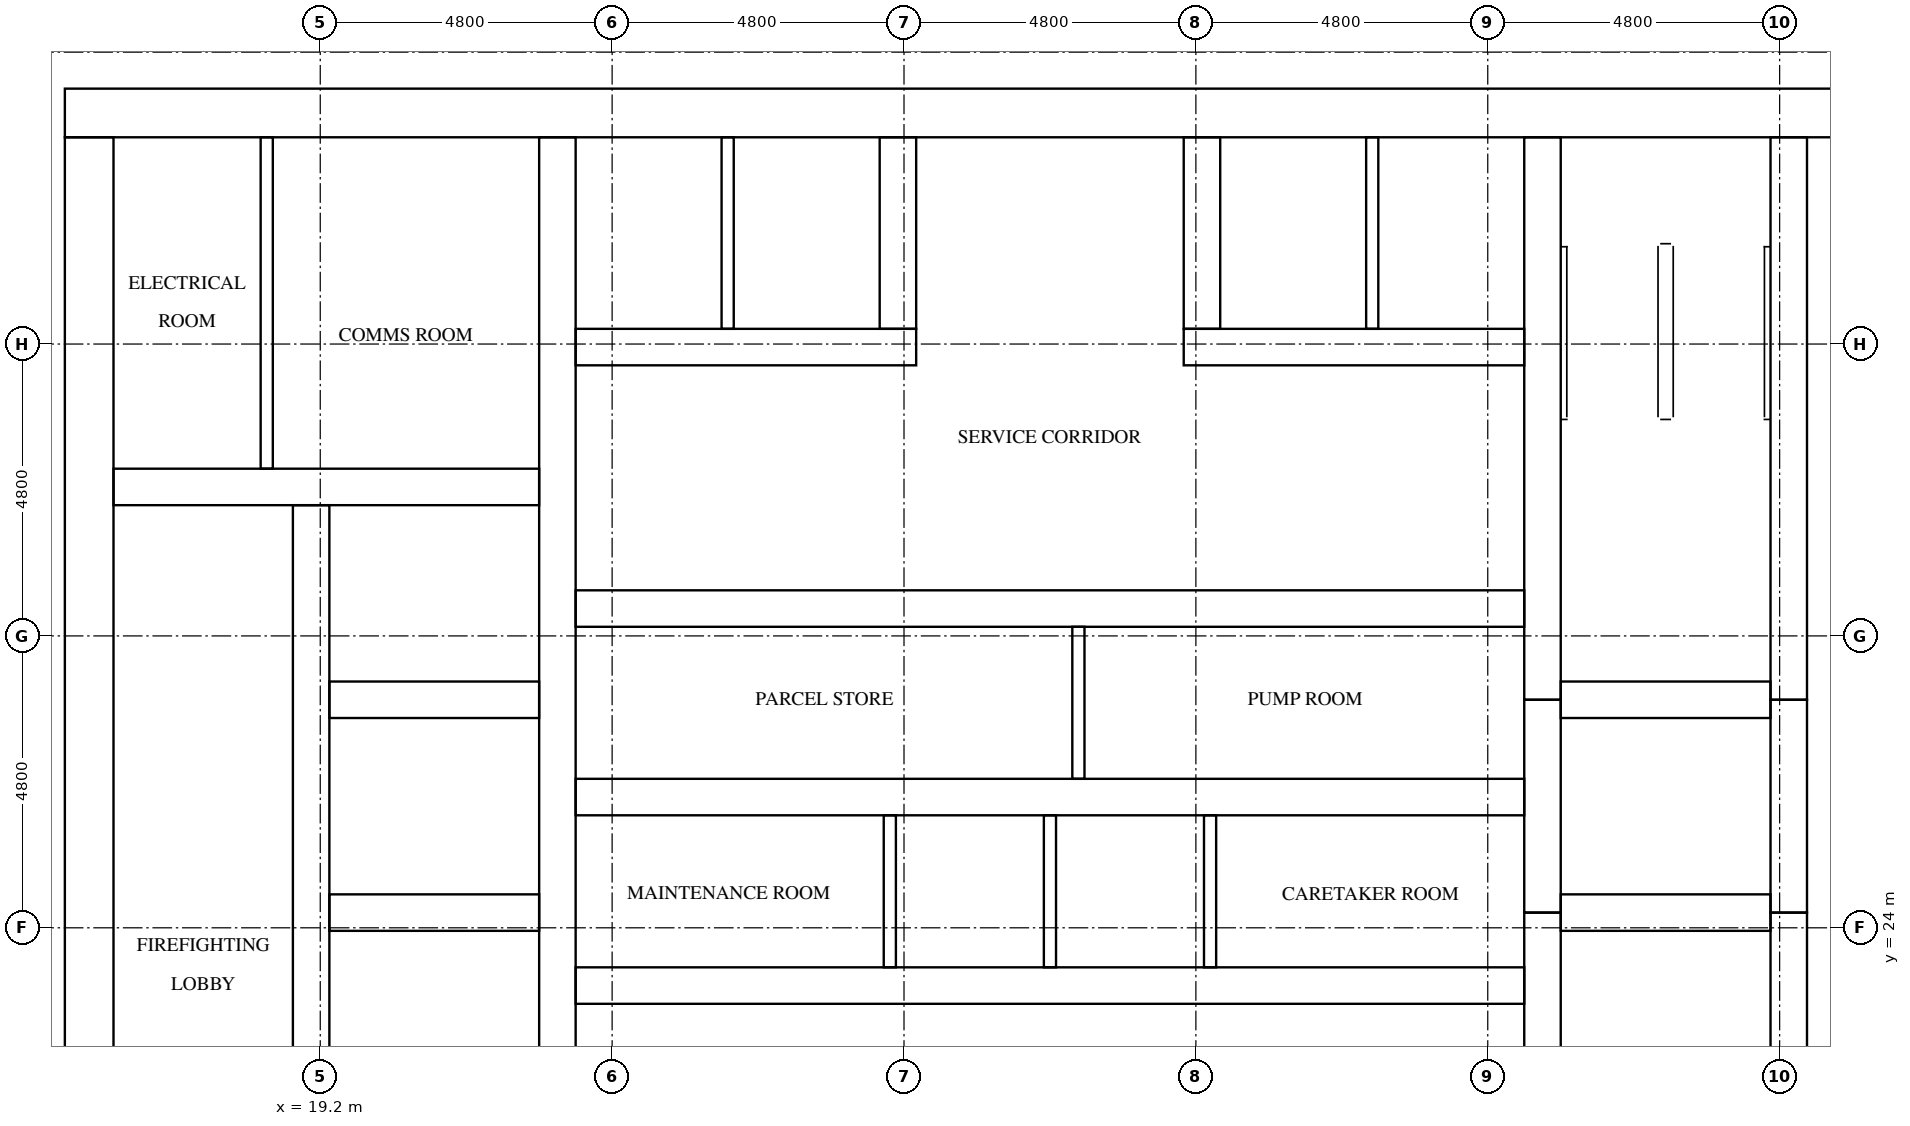
"""IFC4 building model, lengths in metres.
Left out: names, types, materials, properties, quantities, classifications, styles, units other than length and angle.
Written with IfcOpenShell. Run it as: python <this file> out.ifc"""

import sys

from ifc_helpers import new_model, si_unit, direction, frame, frame_2d, origin, place, context, subcontext, project, spatial, rectangle, extrude, element, fill, save


model = new_model("IFC4")
c1 = context("Model", 3, precision=1e-05, world=origin(), true_north=direction((0.0, 1.0)))
c2 = subcontext(c1, "Body", "Model", "MODEL_VIEW")
j1 = project(units=[si_unit("LENGTHUNIT", "METRE"), si_unit("PLANEANGLEUNIT", "RADIAN")], contexts=[c1])
p1 = place(None, origin())
s1 = spatial("IfcSite", under=j1, at=p1, CompositionType="ELEMENT")
p2 = place(p1, origin())
s2 = spatial("IfcBuilding", under=s1, at=p2, CompositionType="ELEMENT")
p3 = place(p2, frame((0.0, 0.0, 129.6)))
s3 = spatial("IfcBuildingStorey", under=s2, at=p3, CompositionType="ELEMENT", Elevation=129.6)
p4 = place(p3, frame((15.0, 37.4, 0.0), z_axis=(0.0, 0.0, 1.0), x_axis=(1.0, 0.0, 0.0)))
e1 = element("IfcWall", 1, at=p4, inside=s3, PredefinedType="SHEAR", context=c2, shape_type="SweptSolid", body=[
    extrude(rectangle(XDim=32.4, YDim=0.8, at=frame_2d((16.2, 0.0))), origin(), (0.0, 0.0, 1.0), 3.2),
])
p5 = place(p4, frame((15.3, 0.0, 0.0)))
e2 = element("IfcOpeningElement", 2, at=p5, cuts=e1, PredefinedType="OPENING", context=c2, shape_type="SweptSolid", body=[
    extrude(rectangle(XDim=1.8, YDim=2.1, at=frame_2d((0.9, 1.05))), frame((0.0, 0.41, 0.0), z_axis=(0.0, -1.0, 0.0), x_axis=(1.0, 0.0, 0.0)), (0.0, 0.0, 1.0), 0.82),
])
p6 = place(p4, frame((1.51, 0.0, 0.0)))
e3 = element("IfcOpeningElement", 3, at=p6, cuts=e1, PredefinedType="OPENING", context=c2, shape_type="SweptSolid", body=[
    extrude(rectangle(XDim=1.0, YDim=2.1, at=frame_2d((0.5, 1.05))), frame((0.0, 0.41, 0.0), z_axis=(0.0, -1.0, 0.0), x_axis=(1.0, 0.0, 0.0)), (0.0, 0.0, 1.0), 0.82),
])
p7 = place(p4, frame((5.11, 0.0, 0.0)))
e4 = element("IfcOpeningElement", 4, at=p7, cuts=e1, PredefinedType="OPENING", context=c2, shape_type="SweptSolid", body=[
    extrude(rectangle(XDim=1.0, YDim=2.1, at=frame_2d((0.5, 1.05))), frame((0.0, 0.41, 0.0), z_axis=(0.0, -1.0, 0.0), x_axis=(1.0, 0.0, 0.0)), (0.0, 0.0, 1.0), 0.82),
])
p8 = place(p3, frame((15.4, 15.8, 0.0), z_axis=(0.0, 0.0, 1.0), x_axis=(0.0, 1.0, 0.0)))
e5 = element("IfcWall", 5, at=p8, inside=s3, PredefinedType="SHEAR", context=c2, shape_type="SweptSolid", body=[
    extrude(rectangle(XDim=21.2, YDim=0.8, at=frame_2d((10.6, 0.0))), origin(), (0.0, 0.0, 1.0), 3.2),
])
p9 = place(p8, frame((4.96, 0.0, 0.0)))
e6 = element("IfcOpeningElement", 6, at=p9, cuts=e5, PredefinedType="OPENING", context=c2, shape_type="SweptSolid", body=[
    extrude(rectangle(XDim=1.2, YDim=2.1, at=frame_2d((0.6, 1.05))), frame((0.0, 0.41, 0.0), z_axis=(0.0, -1.0, 0.0), x_axis=(1.0, 0.0, 0.0)), (0.0, 0.0, 1.0), 0.82),
])
p10 = place(p3, frame((19.05, 15.8, 0.0), z_axis=(0.0, 0.0, 1.0), x_axis=(0.0, 1.0, 0.0)))
e7 = element("IfcWall", 7, at=p10, inside=s3, PredefinedType="SHEAR", context=c2, shape_type="SweptSolid", body=[
    extrude(rectangle(XDim=15.15, YDim=0.6, at=frame_2d((7.575, 0.0))), origin(), (0.0, 0.0, 1.0), 3.2),
])
p11 = place(p10, frame((9.65, 0.0, 0.0)))
e8 = element("IfcOpeningElement", 8, at=p11, cuts=e7, PredefinedType="OPENING", context=c2, shape_type="SweptSolid", body=[
    extrude(rectangle(XDim=1.1, YDim=2.1, at=frame_2d((0.55, 1.05))), frame((0.0, 0.31, 0.0), z_axis=(0.0, -1.0, 0.0), x_axis=(1.0, 0.0, 0.0)), (0.0, 0.0, 1.0), 0.62),
])
p12 = place(p10, frame((13.15, 0.0, 0.0)))
e9 = element("IfcOpeningElement", 9, at=p12, cuts=e7, PredefinedType="OPENING", context=c2, shape_type="SweptSolid", body=[
    extrude(rectangle(XDim=1.1, YDim=2.1, at=frame_2d((0.55, 1.05))), frame((0.0, 0.31, 0.0), z_axis=(0.0, -1.0, 0.0), x_axis=(1.0, 0.0, 0.0)), (0.0, 0.0, 1.0), 0.62),
])
p13 = place(p10, frame((0.4, 0.0, 0.0)))
e10 = element("IfcOpeningElement", 10, at=p13, cuts=e7, PredefinedType="OPENING", context=c2, shape_type="SweptSolid", body=[
    extrude(rectangle(XDim=1.2, YDim=2.1, at=frame_2d((0.6, 1.05))), frame((0.0, 0.31, 0.0), z_axis=(0.0, -1.0, 0.0), x_axis=(1.0, 0.0, 0.0)), (0.0, 0.0, 1.0), 0.62),
])
p14 = place(p3, frame((23.1, 15.8, 0.0), z_axis=(0.0, 0.0, 1.0), x_axis=(0.0, 1.0, 0.0)))
e11 = element("IfcWall", 11, at=p14, inside=s3, PredefinedType="SHEAR", context=c2, shape_type="SweptSolid", body=[
    extrude(rectangle(XDim=21.2, YDim=0.6, at=frame_2d((10.6, 0.0))), origin(), (0.0, 0.0, 1.0), 3.2),
])
p15 = place(p3, frame((39.3, 15.8, 0.0), z_axis=(0.0, 0.0, 1.0), x_axis=(0.0, 1.0, 0.0)))
e12 = element("IfcWall", 12, at=p15, inside=s3, PredefinedType="SHEAR", context=c2, shape_type="SweptSolid", body=[
    extrude(rectangle(XDim=8.45, YDim=0.6, at=frame_2d((4.225, 0.0))), origin(), (0.0, 0.0, 1.0), 3.2),
])
p16 = place(p3, frame((39.3, 24.25, 0.0), z_axis=(0.0, 0.0, 1.0), x_axis=(0.0, 1.0, 0.0)))
e13 = element("IfcWall", 13, at=p16, inside=s3, PredefinedType="SHEAR", context=c2, shape_type="SweptSolid", body=[
    extrude(rectangle(XDim=3.5, YDim=0.6, at=frame_2d((1.75, 0.0))), origin(), (0.0, 0.0, 1.0), 3.2),
])
p17 = place(p3, frame((39.3, 27.75, 0.0), z_axis=(0.0, 0.0, 1.0), x_axis=(0.0, 1.0, 0.0)))
e14 = element("IfcWall", 14, at=p17, inside=s3, PredefinedType="SHEAR", context=c2, shape_type="SweptSolid", body=[
    extrude(rectangle(XDim=9.25, YDim=0.6, at=frame_2d((4.625, 0.0))), origin(), (0.0, 0.0, 1.0), 3.2),
])
p18 = place(p3, frame((43.35, 15.8, 0.0), z_axis=(0.0, 0.0, 1.0), x_axis=(0.0, 1.0, 0.0)))
e15 = element("IfcWall", 15, at=p18, inside=s3, PredefinedType="SHEAR", context=c2, shape_type="SweptSolid", body=[
    extrude(rectangle(XDim=8.45, YDim=0.6, at=frame_2d((4.225, 0.0))), origin(), (0.0, 0.0, 1.0), 3.2),
])
p19 = place(p18, frame((0.4, 0.0, 0.0)))
e16 = element("IfcOpeningElement", 16, at=p19, cuts=e15, PredefinedType="OPENING", context=c2, shape_type="SweptSolid", body=[
    extrude(rectangle(XDim=1.2, YDim=2.1, at=frame_2d((0.6, 1.05))), frame((0.0, 0.31, 0.0), z_axis=(0.0, -1.0, 0.0), x_axis=(1.0, 0.0, 0.0)), (0.0, 0.0, 1.0), 0.62),
])
p20 = place(p3, frame((43.35, 24.25, 0.0), z_axis=(0.0, 0.0, 1.0), x_axis=(0.0, 1.0, 0.0)))
e17 = element("IfcWall", 17, at=p20, inside=s3, PredefinedType="SHEAR", context=c2, shape_type="SweptSolid", body=[
    extrude(rectangle(XDim=3.5, YDim=0.6, at=frame_2d((1.75, 0.0))), origin(), (0.0, 0.0, 1.0), 3.2),
])
p21 = place(p20, frame((1.2, 0.0, 0.0)))
e18 = element("IfcOpeningElement", 18, at=p21, cuts=e17, PredefinedType="OPENING", context=c2, shape_type="SweptSolid", body=[
    extrude(rectangle(XDim=1.1, YDim=2.1, at=frame_2d((0.55, 1.05))), frame((0.0, 0.31, 0.0), z_axis=(0.0, -1.0, 0.0), x_axis=(1.0, 0.0, 0.0)), (0.0, 0.0, 1.0), 0.62),
])
p22 = place(p3, frame((43.35, 27.75, 0.0), z_axis=(0.0, 0.0, 1.0), x_axis=(0.0, 1.0, 0.0)))
e19 = element("IfcWall", 19, at=p22, inside=s3, PredefinedType="SHEAR", context=c2, shape_type="SweptSolid", body=[
    extrude(rectangle(XDim=9.25, YDim=0.6, at=frame_2d((4.625, 0.0))), origin(), (0.0, 0.0, 1.0), 3.2),
])
p23 = place(p22, frame((7.65, 0.0, 0.0)))
e20 = element("IfcOpeningElement", 20, at=p23, cuts=e19, PredefinedType="OPENING", context=c2, shape_type="SweptSolid", body=[
    extrude(rectangle(XDim=1.2, YDim=2.1, at=frame_2d((0.6, 1.05))), frame((0.0, 0.31, 0.0), z_axis=(0.0, -1.0, 0.0), x_axis=(1.0, 0.0, 0.0)), (0.0, 0.0, 1.0), 0.62),
])
for number, where, z_axis, x_axis in (
    (21, (19.35, 24.25, 0.0), (0.0, 0.0, 1.0), (1.0, 0.0, 0.0)),
    (22, (19.35, 27.75, 0.0), (0.0, 0.0, 1.0), (1.0, 0.0, 0.0)),
):
    element("IfcWall", number, at=place(p3, frame(where, z_axis=z_axis, x_axis=x_axis)), inside=s3, PredefinedType="SHEAR", context=c2, shape_type="SweptSolid", body=[
        extrude(rectangle(XDim=3.45, YDim=0.6, at=frame_2d((1.725, 0.0))), origin(), (0.0, 0.0, 1.0), 3.2),
    ])
p24 = place(p3, frame((15.8, 31.25, 0.0), z_axis=(0.0, 0.0, 1.0), x_axis=(1.0, 0.0, 0.0)))
e23 = element("IfcWall", 23, at=p24, inside=s3, PredefinedType="SHEAR", context=c2, shape_type="SweptSolid", body=[
    extrude(rectangle(XDim=7.0, YDim=0.6, at=frame_2d((3.5, 0.0))), origin(), (0.0, 0.0, 1.0), 3.2),
])
for number, where, z_axis, x_axis in (
    (24, (39.6, 24.25, 0.0), (0.0, 0.0, 1.0), (1.0, 0.0, 0.0)),
    (25, (39.6, 27.75, 0.0), (0.0, 0.0, 1.0), (1.0, 0.0, 0.0)),
):
    element("IfcWall", number, at=place(p3, frame(where, z_axis=z_axis, x_axis=x_axis)), inside=s3, PredefinedType="SHEAR", context=c2, shape_type="SweptSolid", body=[
        extrude(rectangle(XDim=3.45, YDim=0.6, at=frame_2d((1.725, 0.0))), origin(), (0.0, 0.0, 1.0), 3.2),
    ])
p25 = place(p3, frame((23.4, 23.05, 0.0), z_axis=(0.0, 0.0, 1.0), x_axis=(1.0, 0.0, 0.0)))
e26 = element("IfcWall", 26, at=p25, inside=s3, PredefinedType="SHEAR", context=c2, shape_type="SweptSolid", body=[
    extrude(rectangle(XDim=15.6, YDim=0.6, at=frame_2d((7.8, 0.0))), origin(), (0.0, 0.0, 1.0), 3.2),
])
p26 = place(p25, frame((2.033, 0.0, 0.0)))
e27 = element("IfcOpeningElement", 27, at=p26, cuts=e26, PredefinedType="OPENING", context=c2, shape_type="SweptSolid", body=[
    extrude(rectangle(XDim=1.0, YDim=2.1, at=frame_2d((0.5, 1.05))), frame((0.0, 0.31, 0.0), z_axis=(0.0, -1.0, 0.0), x_axis=(1.0, 0.0, 0.0)), (0.0, 0.0, 1.0), 0.62),
])
p27 = place(p25, frame((12.567, 0.0, 0.0)))
e28 = element("IfcOpeningElement", 28, at=p27, cuts=e26, PredefinedType="OPENING", context=c2, shape_type="SweptSolid", body=[
    extrude(rectangle(XDim=1.0, YDim=2.1, at=frame_2d((0.5, 1.05))), frame((0.0, 0.31, 0.0), z_axis=(0.0, -1.0, 0.0), x_axis=(1.0, 0.0, 0.0)), (0.0, 0.0, 1.0), 0.62),
])
p28 = place(p3, frame((23.4, 26.15, 0.0), z_axis=(0.0, 0.0, 1.0), x_axis=(1.0, 0.0, 0.0)))
e29 = element("IfcWall", 29, at=p28, inside=s3, PredefinedType="SHEAR", context=c2, shape_type="SweptSolid", body=[
    extrude(rectangle(XDim=15.6, YDim=0.6, at=frame_2d((7.8, 0.0))), origin(), (0.0, 0.0, 1.0), 3.2),
])
p29 = place(p3, frame((23.4, 29.25, 0.0), z_axis=(0.0, 0.0, 1.0), x_axis=(1.0, 0.0, 0.0)))
e30 = element("IfcWall", 30, at=p29, inside=s3, PredefinedType="SHEAR", context=c2, shape_type="SweptSolid", body=[
    extrude(rectangle(XDim=15.6, YDim=0.6, at=frame_2d((7.8, 0.0))), origin(), (0.0, 0.0, 1.0), 3.2),
])
p30 = place(p29, frame((3.584, 0.0, 0.0)))
e31 = element("IfcOpeningElement", 31, at=p30, cuts=e30, PredefinedType="OPENING", context=c2, shape_type="SweptSolid", body=[
    extrude(rectangle(XDim=1.0, YDim=2.1, at=frame_2d((0.5, 1.05))), frame((0.0, 0.31, 0.0), z_axis=(0.0, -1.0, 0.0), x_axis=(1.0, 0.0, 0.0)), (0.0, 0.0, 1.0), 0.62),
])
p31 = place(p29, frame((11.484, 0.0, 0.0)))
e32 = element("IfcOpeningElement", 32, at=p31, cuts=e30, PredefinedType="OPENING", context=c2, shape_type="SweptSolid", body=[
    extrude(rectangle(XDim=1.0, YDim=2.1, at=frame_2d((0.5, 1.05))), frame((0.0, 0.31, 0.0), z_axis=(0.0, -1.0, 0.0), x_axis=(1.0, 0.0, 0.0)), (0.0, 0.0, 1.0), 0.62),
])
for number, where, z_axis, x_axis in (
    (33, (23.4, 33.55, 0.0), (0.0, 0.0, 1.0), (1.0, 0.0, 0.0)),
    (34, (33.4, 33.55, 0.0), (0.0, 0.0, 1.0), (1.0, 0.0, 0.0)),
):
    element("IfcWall", number, at=place(p3, frame(where, z_axis=z_axis, x_axis=x_axis)), inside=s3, PredefinedType="SHEAR", context=c2, shape_type="SweptSolid", body=[
        extrude(rectangle(XDim=5.6, YDim=0.6, at=frame_2d((2.8, 0.0))), origin(), (0.0, 0.0, 1.0), 3.2),
    ])
for number, where, z_axis, x_axis in (
    (35, (28.7, 33.85, 0.0), (0.0, 0.0, 1.0), (0.0, 1.0, 0.0)),
    (36, (33.7, 33.85, 0.0), (0.0, 0.0, 1.0), (0.0, 1.0, 0.0)),
):
    element("IfcWall", number, at=place(p3, frame(where, z_axis=z_axis, x_axis=x_axis)), inside=s3, PredefinedType="SHEAR", context=c2, shape_type="SweptSolid", body=[
        extrude(rectangle(XDim=3.15, YDim=0.6, at=frame_2d((1.575, 0.0))), origin(), (0.0, 0.0, 1.0), 3.2),
    ])
for number, where, z_axis, x_axis in (
    (37, (28.567, 23.35, 0.0), (0.0, 0.0, 1.0), (0.0, 1.0, 0.0)),
    (38, (31.2, 23.35, 0.0), (0.0, 0.0, 1.0), (0.0, 1.0, 0.0)),
    (39, (33.833, 23.35, 0.0), (0.0, 0.0, 1.0), (0.0, 1.0, 0.0)),
):
    element("IfcWall", number, at=place(p3, frame(where, z_axis=z_axis, x_axis=x_axis)), inside=s3, PredefinedType="SOLIDWALL", context=c2, shape_type="SweptSolid", body=[
        extrude(rectangle(XDim=2.5, YDim=0.2, at=frame_2d((1.25, 0.0))), origin(), (0.0, 0.0, 1.0), 3.2),
    ])
for number, where, z_axis, x_axis in (
    (40, (25.9, 33.85, 0.0), (0.0, 0.0, 1.0), (0.0, 1.0, 0.0)),
    (41, (36.5, 33.85, 0.0), (0.0, 0.0, 1.0), (0.0, 1.0, 0.0)),
):
    element("IfcWall", number, at=place(p3, frame(where, z_axis=z_axis, x_axis=x_axis)), inside=s3, PredefinedType="SOLIDWALL", context=c2, shape_type="SweptSolid", body=[
        extrude(rectangle(XDim=3.15, YDim=0.2, at=frame_2d((1.575, 0.0))), origin(), (0.0, 0.0, 1.0), 3.2),
    ])
p32 = place(p3, frame((18.32, 31.55, 0.0), z_axis=(0.0, 0.0, 1.0), x_axis=(0.0, 1.0, 0.0)))
e42 = element("IfcWall", 42, at=p32, inside=s3, PredefinedType="PARTITIONING", context=c2, shape_type="SweptSolid", body=[
    extrude(rectangle(XDim=5.45, YDim=0.2, at=frame_2d((2.725, 0.0))), origin(), (0.0, 0.0, 1.0), 3.2),
])
p33 = place(p3, frame((31.668, 26.45, 0.0), z_axis=(0.0, 0.0, 1.0), x_axis=(0.0, 1.0, 0.0)))
e43 = element("IfcWall", 43, at=p33, inside=s3, PredefinedType="PARTITIONING", context=c2, shape_type="SweptSolid", body=[
    extrude(rectangle(XDim=2.5, YDim=0.2, at=frame_2d((1.25, 0.0))), origin(), (0.0, 0.0, 1.0), 3.2),
])
p34 = place(p11, origin())
e44 = element("IfcDoor", 44, at=p34, inside=s3, OperationType="DOUBLE_DOOR_SLIDING", PredefinedType="DOOR", context=c2, shape_type="SweptSolid", body=[
    extrude(rectangle(XDim=1.1, YDim=2.1, at=frame_2d((0.55, 1.05))), frame((0.0, 0.025, 0.0), z_axis=(0.0, -1.0, 0.0), x_axis=(1.0, 0.0, 0.0)), (0.0, 0.0, 1.0), 0.05),
])
fill(e8, e44)
p35 = place(p12, origin())
e45 = element("IfcDoor", 45, at=p35, inside=s3, OperationType="DOUBLE_DOOR_SLIDING", PredefinedType="DOOR", context=c2, shape_type="SweptSolid", body=[
    extrude(rectangle(XDim=1.1, YDim=2.1, at=frame_2d((0.55, 1.05))), frame((0.0, 0.025, 0.0), z_axis=(0.0, -1.0, 0.0), x_axis=(1.0, 0.0, 0.0)), (0.0, 0.0, 1.0), 0.05),
])
fill(e9, e45)
p36 = place(p21, origin())
e46 = element("IfcDoor", 46, at=p36, inside=s3, OperationType="DOUBLE_DOOR_SLIDING", PredefinedType="DOOR", context=c2, shape_type="SweptSolid", body=[
    extrude(rectangle(XDim=1.1, YDim=2.1, at=frame_2d((0.55, 1.05))), frame((0.0, 0.025, 0.0), z_axis=(0.0, -1.0, 0.0), x_axis=(1.0, 0.0, 0.0)), (0.0, 0.0, 1.0), 0.05),
])
fill(e18, e46)
p37 = place(p23, origin())
e47 = element("IfcDoor", 47, at=p37, inside=s3, OperationType="SINGLE_SWING_LEFT", PredefinedType="DOOR", context=c2, shape_type="SweptSolid", body=[
    extrude(rectangle(XDim=1.2, YDim=2.1, at=frame_2d((0.6, 1.05))), frame((0.0, 0.025, 0.0), z_axis=(0.0, -1.0, 0.0), x_axis=(1.0, 0.0, 0.0)), (0.0, 0.0, 1.0), 0.05),
])
fill(e20, e47)
p38 = place(p5, origin())
e48 = element("IfcDoor", 48, at=p38, inside=s3, OperationType="DOUBLE_DOOR_SINGLE_SWING", PredefinedType="DOOR", context=c2, shape_type="SweptSolid", body=[
    extrude(rectangle(XDim=1.8, YDim=2.1, at=frame_2d((0.9, 1.05))), frame((0.0, 0.025, 0.0), z_axis=(0.0, -1.0, 0.0), x_axis=(1.0, 0.0, 0.0)), (0.0, 0.0, 1.0), 0.05),
])
fill(e2, e48)
p39 = place(p6, origin())
e49 = element("IfcDoor", 49, at=p39, inside=s3, OperationType="SINGLE_SWING_RIGHT", PredefinedType="DOOR", context=c2, shape_type="SweptSolid", body=[
    extrude(rectangle(XDim=1.0, YDim=2.1, at=frame_2d((0.5, 1.05))), frame((0.0, 0.025, 0.0), z_axis=(0.0, -1.0, 0.0), x_axis=(1.0, 0.0, 0.0)), (0.0, 0.0, 1.0), 0.05),
])
fill(e3, e49)
p40 = place(p7, origin())
e50 = element("IfcDoor", 50, at=p40, inside=s3, OperationType="SINGLE_SWING_LEFT", PredefinedType="DOOR", context=c2, shape_type="SweptSolid", body=[
    extrude(rectangle(XDim=1.0, YDim=2.1, at=frame_2d((0.5, 1.05))), frame((0.0, 0.025, 0.0), z_axis=(0.0, -1.0, 0.0), x_axis=(1.0, 0.0, 0.0)), (0.0, 0.0, 1.0), 0.05),
])
fill(e4, e50)
p41 = place(p26, frame((1.0, 0.0, 0.0), z_axis=(0.0, 0.0, 1.0), x_axis=(-1.0, 0.0, 0.0)))
e51 = element("IfcDoor", 51, at=p41, inside=s3, OperationType="SINGLE_SWING_RIGHT", PredefinedType="DOOR", context=c2, shape_type="SweptSolid", body=[
    extrude(rectangle(XDim=1.0, YDim=2.1, at=frame_2d((0.5, 1.05))), frame((0.0, 0.025, 0.0), z_axis=(0.0, -1.0, 0.0), x_axis=(1.0, 0.0, 0.0)), (0.0, 0.0, 1.0), 0.05),
])
fill(e27, e51)
p42 = place(p27, frame((1.0, 0.0, 0.0), z_axis=(0.0, 0.0, 1.0), x_axis=(-1.0, 0.0, 0.0)))
e52 = element("IfcDoor", 52, at=p42, inside=s3, OperationType="SINGLE_SWING_LEFT", PredefinedType="DOOR", context=c2, shape_type="SweptSolid", body=[
    extrude(rectangle(XDim=1.0, YDim=2.1, at=frame_2d((0.5, 1.05))), frame((0.0, 0.025, 0.0), z_axis=(0.0, -1.0, 0.0), x_axis=(1.0, 0.0, 0.0)), (0.0, 0.0, 1.0), 0.05),
])
fill(e28, e52)
p43 = place(p30, origin())
e53 = element("IfcDoor", 53, at=p43, inside=s3, OperationType="SINGLE_SWING_RIGHT", PredefinedType="DOOR", context=c2, shape_type="SweptSolid", body=[
    extrude(rectangle(XDim=1.0, YDim=2.1, at=frame_2d((0.5, 1.05))), frame((0.0, 0.025, 0.0), z_axis=(0.0, -1.0, 0.0), x_axis=(1.0, 0.0, 0.0)), (0.0, 0.0, 1.0), 0.05),
])
fill(e31, e53)
p44 = place(p31, origin())
e54 = element("IfcDoor", 54, at=p44, inside=s3, OperationType="SINGLE_SWING_LEFT", PredefinedType="DOOR", context=c2, shape_type="SweptSolid", body=[
    extrude(rectangle(XDim=1.0, YDim=2.1, at=frame_2d((0.5, 1.05))), frame((0.0, 0.025, 0.0), z_axis=(0.0, -1.0, 0.0), x_axis=(1.0, 0.0, 0.0)), (0.0, 0.0, 1.0), 0.05),
])
fill(e32, e54)
save(model, sys.argv[1])
